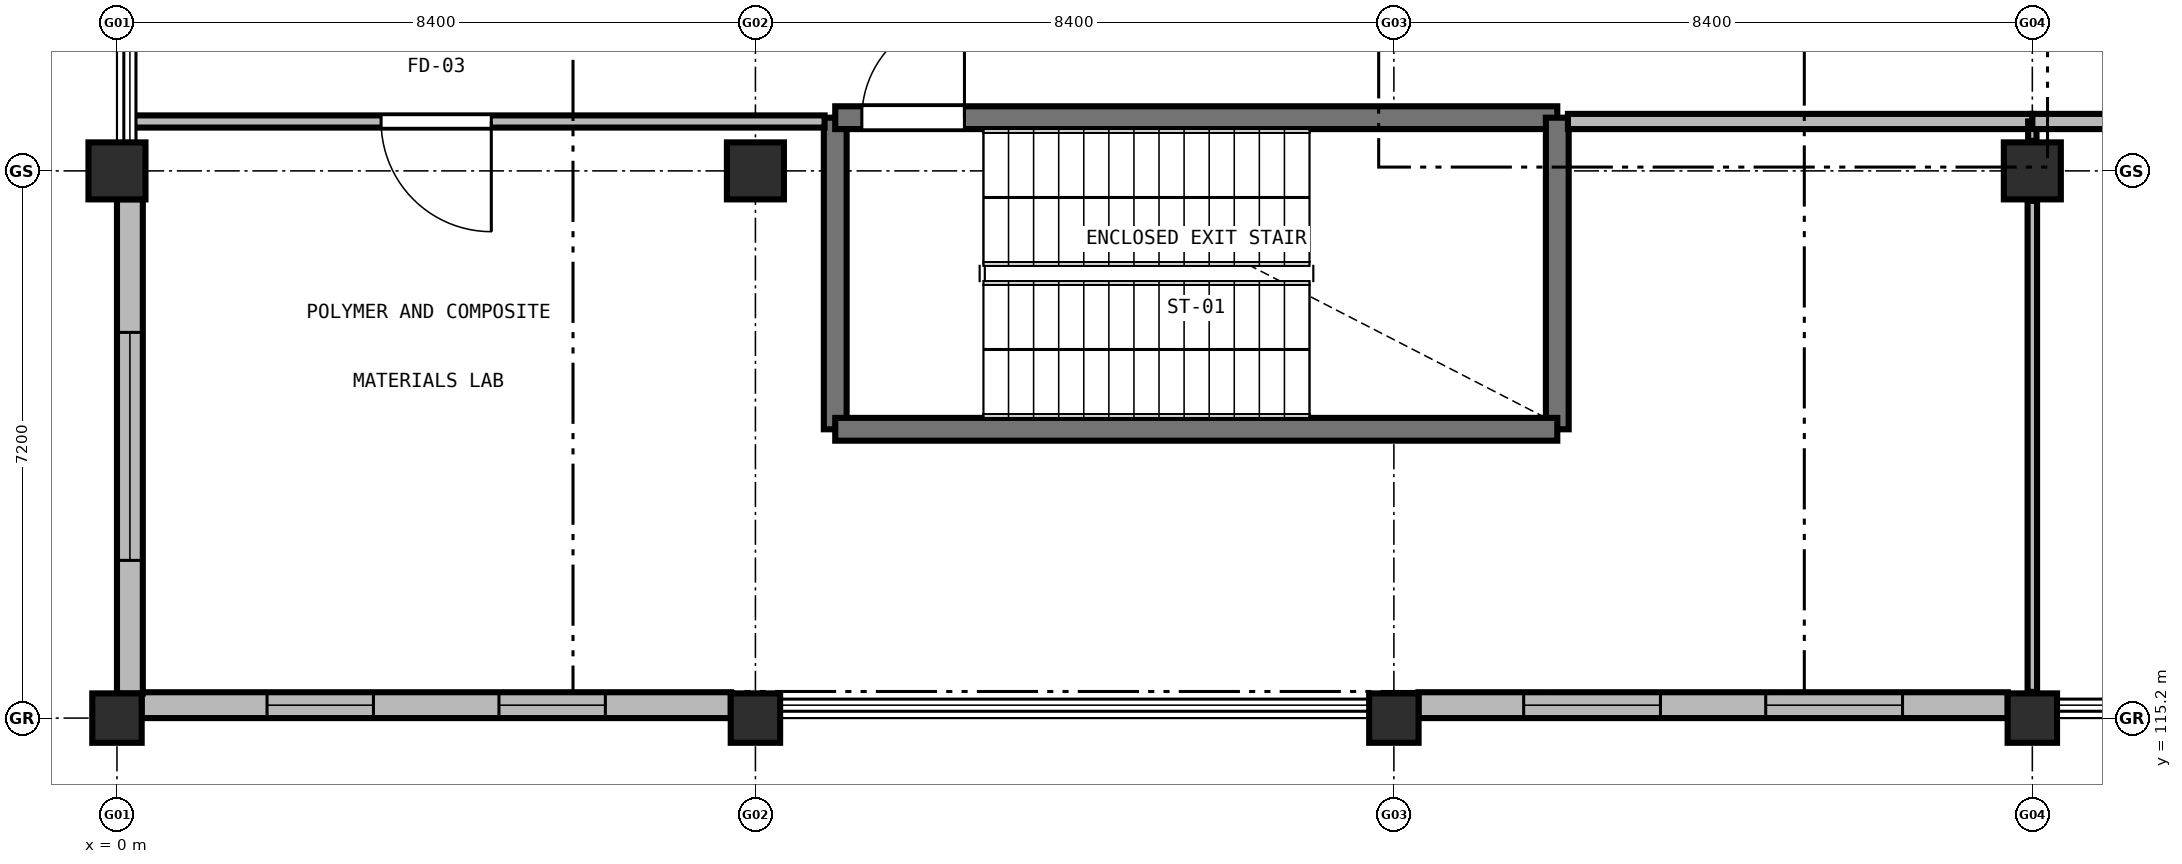
"""IFC4 building model, lengths in metres.
Left out: names, types, materials, properties, quantities, classifications, styles, units other than length and angle.
Written with IfcOpenShell. Run it as: python <this file> out.ifc"""

import sys

from ifc_helpers import new_model, si_unit, direction, frame, frame_2d, origin, origin_2d, place, context, subcontext, project, spatial, rectangle, extrude, element, fill, save


model = new_model("IFC4")
c1 = context("Model", 3, precision=1e-05, world=origin(), true_north=direction((0.0, 1.0)))
c2 = subcontext(c1, "Body", "Model", "MODEL_VIEW")
j1 = project(units=[si_unit("LENGTHUNIT", "METRE"), si_unit("PLANEANGLEUNIT", "RADIAN")], contexts=[c1])
p1 = place(None, origin())
s1 = spatial("IfcSite", under=j1, at=p1, CompositionType="ELEMENT")
p2 = place(p1, origin())
s2 = spatial("IfcBuilding", under=s1, at=p2, CompositionType="ELEMENT")
p3 = place(p2, frame((0.0, 0.0, 5.1)))
s3 = spatial("IfcBuildingStorey", under=s2, at=p3, CompositionType="ELEMENT", Elevation=5.1)
p4 = place(p3, frame((0.0, 115.2, 0.0), z_axis=(0.0, 0.0, 1.0), x_axis=(1.0, 0.0, 0.0)))
e1 = element("IfcColumn", 1, at=p4, inside=s3, PredefinedType="COLUMN", context=c2, shape_type="SweptSolid", body=[
    extrude(rectangle(XDim=0.65, YDim=0.65, at=origin_2d()), origin(), (0.0, 0.0, 1.0), 4.2),
])
p5 = place(p3, frame((0.0, 122.4, 0.0), z_axis=(0.0, 0.0, 1.0), x_axis=(1.0, 0.0, 0.0)))
e2 = element("IfcColumn", 2, at=p5, inside=s3, PredefinedType="COLUMN", context=c2, shape_type="SweptSolid", body=[
    extrude(rectangle(XDim=0.75, YDim=0.75, at=origin_2d()), origin(), (0.0, 0.0, 1.0), 4.2),
])
p6 = place(p3, frame((8.4, 115.2, 0.0), z_axis=(0.0, 0.0, 1.0), x_axis=(1.0, 0.0, 0.0)))
e3 = element("IfcColumn", 3, at=p6, inside=s3, PredefinedType="COLUMN", context=c2, shape_type="SweptSolid", body=[
    extrude(rectangle(XDim=0.65, YDim=0.65, at=origin_2d()), origin(), (0.0, 0.0, 1.0), 4.2),
])
p7 = place(p3, frame((8.4, 122.4, 0.0), z_axis=(0.0, 0.0, 1.0), x_axis=(1.0, 0.0, 0.0)))
e4 = element("IfcColumn", 4, at=p7, inside=s3, PredefinedType="COLUMN", context=c2, shape_type="SweptSolid", body=[
    extrude(rectangle(XDim=0.75, YDim=0.75, at=origin_2d()), origin(), (0.0, 0.0, 1.0), 4.2),
])
for number, where, z_axis, x_axis in (
    (5, (16.8, 115.2, 0.0), (0.0, 0.0, 1.0), (1.0, 0.0, 0.0)),
    (6, (25.2, 115.2, 0.0), (0.0, 0.0, 1.0), (1.0, 0.0, 0.0)),
):
    element("IfcColumn", number, at=place(p3, frame(where, z_axis=z_axis, x_axis=x_axis)), inside=s3, PredefinedType="COLUMN", context=c2, shape_type="SweptSolid", body=[
        extrude(rectangle(XDim=0.65, YDim=0.65, at=origin_2d()), origin(), (0.0, 0.0, 1.0), 4.2),
    ])
p8 = place(p3, frame((25.2, 122.4, 0.0), z_axis=(0.0, 0.0, 1.0), x_axis=(1.0, 0.0, 0.0)))
e7 = element("IfcColumn", 7, at=p8, inside=s3, PredefinedType="COLUMN", context=c2, shape_type="SweptSolid", body=[
    extrude(rectangle(XDim=0.75, YDim=0.75, at=origin_2d()), origin(), (0.0, 0.0, 1.0), 4.2),
])
p9 = place(p3, frame((24.877, 115.37, 0.0), z_axis=(0.0, 0.0, 1.0), x_axis=(-1.0, 0.0, 0.0)))
e8 = element("IfcWall", 8, at=p9, inside=s3, PredefinedType="SOLIDWALL", context=c2, shape_type="SweptSolid", body=[
    extrude(rectangle(XDim=7.754, YDim=0.34, at=frame_2d((3.877, 0.0))), origin(), (0.0, 0.0, 1.0), 3.11),
])
p10 = place(p9, frame((1.385, 0.0, 0.95)))
e9 = element("IfcOpeningElement", 9, at=p10, cuts=e8, PredefinedType="OPENING", context=c2, shape_type="SweptSolid", body=[
    extrude(rectangle(XDim=1.8, YDim=1.91, at=frame_2d((0.9, 0.955))), frame((0.0, 0.18, 0.0), z_axis=(0.0, -1.0, 0.0), x_axis=(1.0, 0.0, 0.0)), (0.0, 0.0, 1.0), 0.36),
])
p11 = place(p9, frame((4.569, 0.0, 0.95)))
e10 = element("IfcOpeningElement", 10, at=p11, cuts=e8, PredefinedType="OPENING", context=c2, shape_type="SweptSolid", body=[
    extrude(rectangle(XDim=1.8, YDim=1.91, at=frame_2d((0.9, 0.955))), frame((0.0, 0.18, 0.0), z_axis=(0.0, -1.0, 0.0), x_axis=(1.0, 0.0, 0.0)), (0.0, 0.0, 1.0), 0.36),
])
p12 = place(p3, frame((8.077, 115.37, 0.0), z_axis=(0.0, 0.0, 1.0), x_axis=(-1.0, 0.0, 0.0)))
e11 = element("IfcWall", 11, at=p12, inside=s3, PredefinedType="SOLIDWALL", context=c2, shape_type="SweptSolid", body=[
    extrude(rectangle(XDim=7.754, YDim=0.34, at=frame_2d((3.877, 0.0))), origin(), (0.0, 0.0, 1.0), 3.11),
])
p13 = place(p12, frame((1.651, 0.0, 0.95)))
e12 = element("IfcOpeningElement", 12, at=p13, cuts=e11, PredefinedType="OPENING", context=c2, shape_type="SweptSolid", body=[
    extrude(rectangle(XDim=1.4, YDim=1.9, at=frame_2d((0.7, 0.95))), frame((0.0, 0.18, 0.0), z_axis=(0.0, -1.0, 0.0), x_axis=(1.0, 0.0, 0.0)), (0.0, 0.0, 1.0), 0.36),
])
p14 = place(p12, frame((4.703, 0.0, 0.95)))
e13 = element("IfcOpeningElement", 13, at=p14, cuts=e11, PredefinedType="OPENING", context=c2, shape_type="SweptSolid", body=[
    extrude(rectangle(XDim=1.4, YDim=1.9, at=frame_2d((0.7, 0.95))), frame((0.0, 0.18, 0.0), z_axis=(0.0, -1.0, 0.0), x_axis=(1.0, 0.0, 0.0)), (0.0, 0.0, 1.0), 0.36),
])
p15 = place(p3, frame((0.17, 115.523, 0.0), z_axis=(0.0, 0.0, 1.0), x_axis=(0.0, 1.0, 0.0)))
e14 = element("IfcWall", 14, at=p15, inside=s3, PredefinedType="SOLIDWALL", context=c2, shape_type="SweptSolid", body=[
    extrude(rectangle(XDim=6.504, YDim=0.34, at=frame_2d((3.252, 0.0))), origin(), (0.0, 0.0, 1.0), 3.31),
])
p16 = place(p15, frame((1.752, 0.0, 0.95)))
e15 = element("IfcOpeningElement", 15, at=p16, cuts=e14, PredefinedType="OPENING", context=c2, shape_type="SweptSolid", body=[
    extrude(rectangle(XDim=3.0, YDim=2.1, at=frame_2d((1.5, 1.05))), frame((0.0, 0.18, 0.0), z_axis=(0.0, -1.0, 0.0), x_axis=(1.0, 0.0, 0.0)), (0.0, 0.0, 1.0), 0.36),
])
p17 = place(p3, frame((9.45, 119.0, 0.0), z_axis=(0.0, 0.0, 1.0), x_axis=(0.0, 1.0, 0.0)))
e16 = element("IfcWall", 16, at=p17, inside=s3, PredefinedType="SHEAR", context=c2, shape_type="SweptSolid", body=[
    extrude(rectangle(XDim=4.1, YDim=0.3, at=frame_2d((2.05, 0.0))), origin(), (0.0, 0.0, 1.0), 3.92),
])
p18 = place(p3, frame((9.45, 123.1, 0.0), z_axis=(0.0, 0.0, 1.0), x_axis=(1.0, 0.0, 0.0)))
e17 = element("IfcWall", 17, at=p18, inside=s3, PredefinedType="SHEAR", context=c2, shape_type="SweptSolid", body=[
    extrude(rectangle(XDim=9.5, YDim=0.3, at=frame_2d((4.75, 0.0))), origin(), (0.0, 0.0, 1.0), 3.92),
])
p19 = place(p18, frame((0.35, 0.0, 0.0)))
e18 = element("IfcOpeningElement", 18, at=p19, cuts=e17, PredefinedType="OPENING", context=c2, shape_type="SweptSolid", body=[
    extrude(rectangle(XDim=1.35, YDim=2.2, at=frame_2d((0.675, 1.1))), frame((0.0, 0.16, 0.0), z_axis=(0.0, -1.0, 0.0), x_axis=(1.0, 0.0, 0.0)), (0.0, 0.0, 1.0), 0.32),
])
p20 = place(p3, frame((18.95, 123.1, 0.0), z_axis=(0.0, 0.0, 1.0), x_axis=(0.0, -1.0, 0.0)))
e19 = element("IfcWall", 19, at=p20, inside=s3, PredefinedType="SHEAR", context=c2, shape_type="SweptSolid", body=[
    extrude(rectangle(XDim=4.1, YDim=0.3, at=frame_2d((2.05, 0.0))), origin(), (0.0, 0.0, 1.0), 3.92),
])
p21 = place(p3, frame((18.95, 119.0, 0.0), z_axis=(0.0, 0.0, 1.0), x_axis=(-1.0, 0.0, 0.0)))
e20 = element("IfcWall", 20, at=p21, inside=s3, PredefinedType="SHEAR", context=c2, shape_type="SweptSolid", body=[
    extrude(rectangle(XDim=9.5, YDim=0.3, at=frame_2d((4.75, 0.0))), origin(), (0.0, 0.0, 1.0), 3.92),
])
p22 = place(p3, frame((25.2, 123.05, 0.0), z_axis=(0.0, 0.0, 1.0), x_axis=(-1.0, 0.0, 0.0)))
e21 = element("IfcWall", 21, at=p22, inside=s3, PredefinedType="SOLIDWALL", context=c2, shape_type="SweptSolid", body=[
    extrude(rectangle(XDim=6.11, YDim=0.2, at=frame_2d((3.055, 0.0))), origin(), (0.0, 0.0, 1.0), 3.305),
])
p23 = place(p3, frame((9.31, 123.05, 0.0), z_axis=(0.0, 0.0, 1.0), x_axis=(-1.0, 0.0, 0.0)))
e22 = element("IfcWall", 22, at=p23, inside=s3, PredefinedType="PARTITIONING", context=c2, shape_type="SweptSolid", body=[
    extrude(rectangle(XDim=9.09, YDim=0.16, at=frame_2d((4.545, 0.0))), origin(), (0.0, 0.0, 1.0), 3.305),
])
p24 = place(p23, frame((4.385, 0.0, 0.0)))
e23 = element("IfcOpeningElement", 23, at=p24, cuts=e22, PredefinedType="OPENING", context=c2, shape_type="SweptSolid", body=[
    extrude(rectangle(XDim=1.45, YDim=2.2, at=frame_2d((0.725, 1.1))), frame((0.0, 0.09, 0.0), z_axis=(0.0, -1.0, 0.0), x_axis=(1.0, 0.0, 0.0)), (0.0, 0.0, 1.0), 0.18),
])
p25 = place(p3, frame((25.2, 115.545, 0.0), z_axis=(0.0, 0.0, 1.0), x_axis=(0.0, 1.0, 0.0)))
e24 = element("IfcWall", 24, at=p25, inside=s3, PredefinedType="PARTITIONING", context=c2, shape_type="SweptSolid", body=[
    extrude(rectangle(XDim=6.46, YDim=0.125, at=frame_2d((3.23, 0.0))), origin(), (0.0, 0.0, 1.0), 3.105),
])
p26 = place(p3, frame((25.2, 122.795, 0.0), z_axis=(0.0, 0.0, 1.0), x_axis=(0.0, 1.0, 0.0)))
e25 = element("IfcWall", 25, at=p26, inside=s3, PredefinedType="PARTITIONING", context=c2, shape_type="SweptSolid", body=[
    extrude(rectangle(XDim=0.255, YDim=0.11, at=frame_2d((0.127, 0.0))), origin(), (0.0, 0.0, 1.0), 3.155),
])
p27 = place(p3, frame((33.6, 123.05, 0.0), z_axis=(0.0, 0.0, 1.0), x_axis=(-1.0, 0.0, 0.0)))
e26 = element("IfcWall", 26, at=p27, inside=s3, PredefinedType="SOLIDWALL", context=c2, shape_type="SweptSolid", body=[
    extrude(rectangle(XDim=8.4, YDim=0.2, at=frame_2d((4.2, 0.0))), origin(), (0.0, 0.0, 1.0), 3.305),
])
p28 = place(p27, frame((3.425, 0.0, 0.0)))
e27 = element("IfcOpeningElement", 27, at=p28, cuts=e26, PredefinedType="OPENING", context=c2, shape_type="SweptSolid", body=[
    extrude(rectangle(XDim=1.55, YDim=2.2, at=frame_2d((0.775, 1.1))), frame((0.0, 0.11, 0.0), z_axis=(0.0, -1.0, 0.0), x_axis=(1.0, 0.0, 0.0)), (0.0, 0.0, 1.0), 0.22),
])
p29 = place(p10, origin())
e28 = element("IfcWindow", 28, at=p29, inside=s3, PartitioningType="SINGLE_PANEL", PredefinedType="WINDOW", context=c2, shape_type="SweptSolid", body=[
    extrude(rectangle(XDim=1.8, YDim=1.91, at=frame_2d((0.9, 0.955))), frame((0.0, 0.03, 0.0), z_axis=(0.0, -1.0, 0.0), x_axis=(1.0, 0.0, 0.0)), (0.0, 0.0, 1.0), 0.06),
])
fill(e9, e28)
p30 = place(p11, origin())
e29 = element("IfcWindow", 29, at=p30, inside=s3, PartitioningType="SINGLE_PANEL", PredefinedType="WINDOW", context=c2, shape_type="SweptSolid", body=[
    extrude(rectangle(XDim=1.8, YDim=1.91, at=frame_2d((0.9, 0.955))), frame((0.0, 0.03, 0.0), z_axis=(0.0, -1.0, 0.0), x_axis=(1.0, 0.0, 0.0)), (0.0, 0.0, 1.0), 0.06),
])
fill(e10, e29)
p31 = place(p13, origin())
e30 = element("IfcWindow", 30, at=p31, inside=s3, PartitioningType="SINGLE_PANEL", PredefinedType="WINDOW", context=c2, shape_type="SweptSolid", body=[
    extrude(rectangle(XDim=1.4, YDim=1.9, at=frame_2d((0.7, 0.95))), frame((0.0, 0.03, 0.0), z_axis=(0.0, -1.0, 0.0), x_axis=(1.0, 0.0, 0.0)), (0.0, 0.0, 1.0), 0.06),
])
fill(e12, e30)
p32 = place(p14, origin())
e31 = element("IfcWindow", 31, at=p32, inside=s3, PartitioningType="SINGLE_PANEL", PredefinedType="WINDOW", context=c2, shape_type="SweptSolid", body=[
    extrude(rectangle(XDim=1.4, YDim=1.9, at=frame_2d((0.7, 0.95))), frame((0.0, 0.03, 0.0), z_axis=(0.0, -1.0, 0.0), x_axis=(1.0, 0.0, 0.0)), (0.0, 0.0, 1.0), 0.06),
])
fill(e13, e31)
p33 = place(p16, origin())
e32 = element("IfcWindow", 32, at=p33, inside=s3, PartitioningType="SINGLE_PANEL", PredefinedType="WINDOW", context=c2, shape_type="SweptSolid", body=[
    extrude(rectangle(XDim=3.0, YDim=2.1, at=frame_2d((1.5, 1.05))), frame((0.0, 0.03, 0.0), z_axis=(0.0, -1.0, 0.0), x_axis=(1.0, 0.0, 0.0)), (0.0, 0.0, 1.0), 0.06),
])
fill(e15, e32)
p34 = place(p19, origin())
e33 = element("IfcDoor", 33, at=p34, inside=s3, OperationType="SINGLE_SWING_RIGHT", PredefinedType="DOOR", context=c2, shape_type="SweptSolid", body=[
    extrude(rectangle(XDim=1.35, YDim=2.2, at=frame_2d((0.675, 1.1))), frame((0.0, 0.025, 0.0), z_axis=(0.0, -1.0, 0.0), x_axis=(1.0, 0.0, 0.0)), (0.0, 0.0, 1.0), 0.05),
])
fill(e18, e33)
p35 = place(p24, origin())
e34 = element("IfcDoor", 34, at=p35, inside=s3, OperationType="SINGLE_SWING_LEFT", PredefinedType="DOOR", context=c2, shape_type="SweptSolid", body=[
    extrude(rectangle(XDim=1.45, YDim=2.2, at=frame_2d((0.725, 1.1))), frame((0.0, 0.025, 0.0), z_axis=(0.0, -1.0, 0.0), x_axis=(1.0, 0.0, 0.0)), (0.0, 0.0, 1.0), 0.05),
])
fill(e23, e34)
save(model, sys.argv[1])
